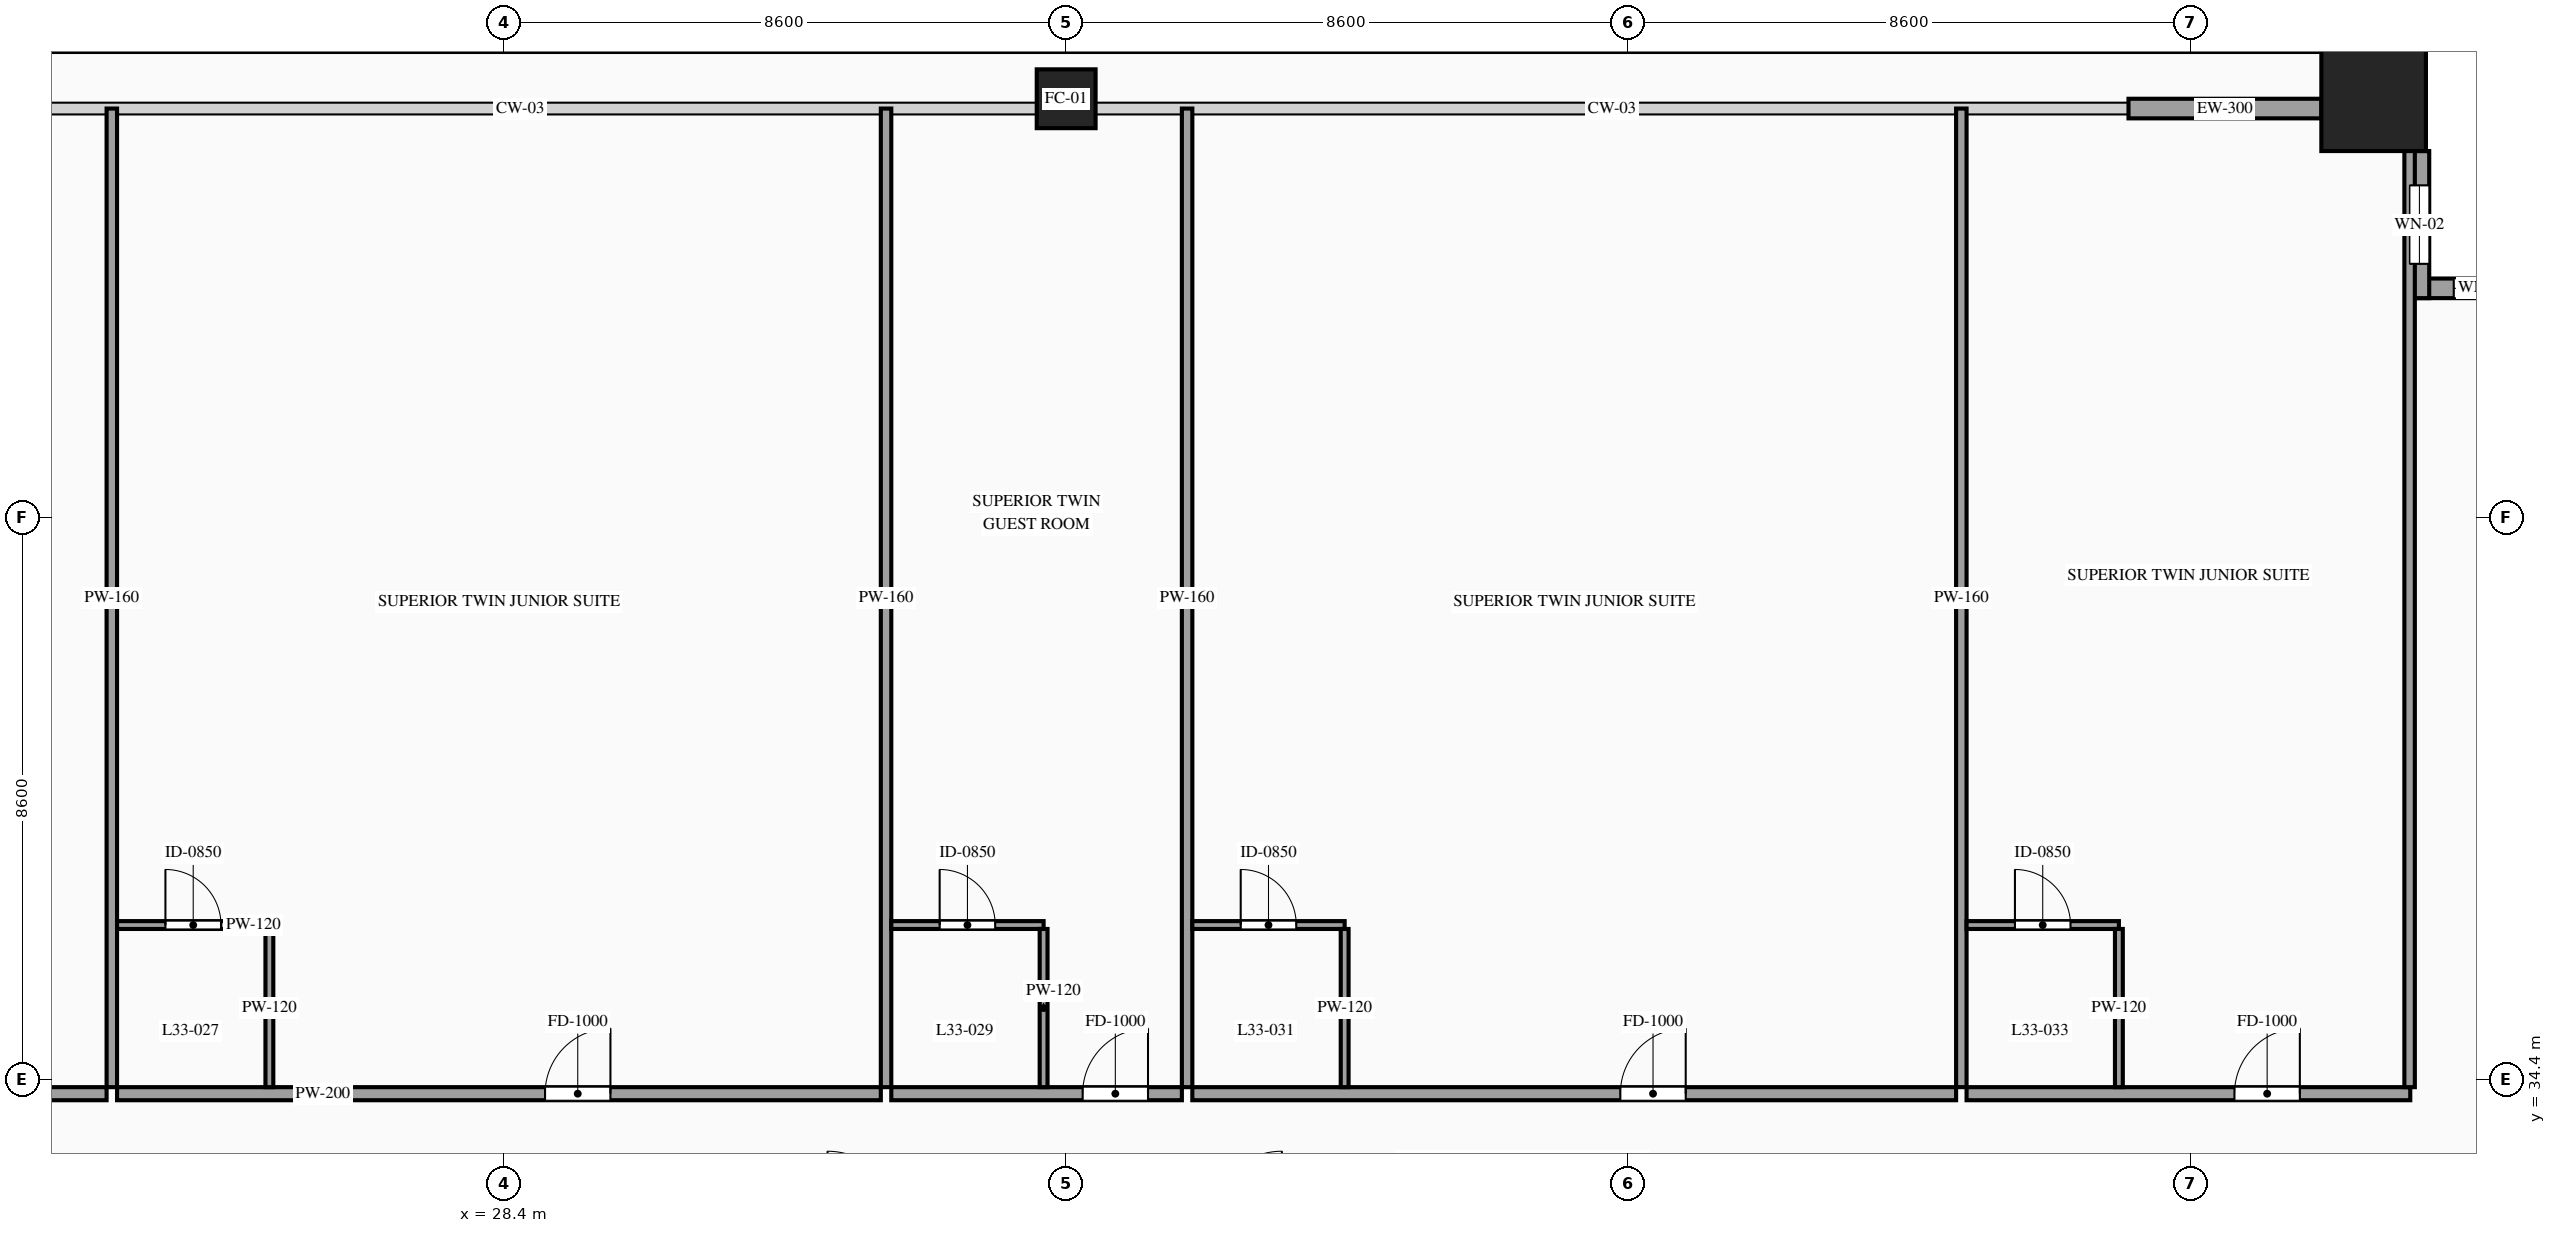
"""IFC4 building model, lengths in metres.
Left out: names, types, materials, properties, quantities, classifications, styles, units other than length and angle.
Written with IfcOpenShell. Run it as: python <this file> out.ifc"""

import sys

from ifc_helpers import new_model, si_unit, direction, frame, frame_2d, origin, origin_2d, place, context, subcontext, project, spatial, rectangle, hollow_rectangle, extrude, source, transform, mapped, element, fill, save


model = new_model("IFC4")
c1 = context("Model", 3, precision=1e-05, world=origin(), true_north=direction((0.0, 1.0)))
c2 = subcontext(c1, "Body", "Model", "MODEL_VIEW")
j1 = project(units=[si_unit("LENGTHUNIT", "METRE"), si_unit("PLANEANGLEUNIT", "RADIAN")], contexts=[c1])
p1 = place(None, origin())
s1 = spatial("IfcSite", under=j1, at=p1, CompositionType="ELEMENT")
p2 = place(p1, origin())
s2 = spatial("IfcBuilding", under=s1, at=p2, CompositionType="ELEMENT")
p3 = place(p2, frame((0.0, 0.0, 126.2)))
s3 = spatial("IfcBuildingStorey", under=s2, at=p3, CompositionType="ELEMENT", Elevation=126.2)
m1 = source(origin(), c2, "Body", "SweptSolid", [
    extrude(hollow_rectangle(XDim=0.9, YDim=0.9, WallThickness=0.042, at=origin_2d()), origin(), (0.0, 0.0, 1.0), 3.6),
])
p4 = place(p3, frame((37.0, 49.4, 0.0), z_axis=(0.0, 0.0, 1.0), x_axis=(1.0, 0.0, 0.0)))
e1 = element("IfcColumn", 1, at=p4, inside=s3, PredefinedType="COLUMN", context=c2, shape_type="MappedRepresentation", body=[
    mapped(m1, transform((0.0, 0.0, 0.0), scale=1.0)),
])
m2 = source(origin(), c2, "Body", "SweptSolid", [
    extrude(hollow_rectangle(XDim=1.6, YDim=1.6, WallThickness=0.07, at=origin_2d()), origin(), (0.0, 0.0, 1.0), 3.6),
])
p5 = place(p3, frame((57.0, 49.4, 0.0), z_axis=(0.0, 0.0, 1.0), x_axis=(1.0, 0.0, 0.0)))
e2 = element("IfcColumn", 2, at=p5, inside=s3, PredefinedType="COLUMN", context=c2, shape_type="MappedRepresentation", body=[
    mapped(m2, transform((0.0, 0.0, 0.0), scale=1.0)),
])
p6 = place(p3, frame((59.8, 46.5, 0.0), z_axis=(0.0, 0.0, 1.0), x_axis=(-1.0, 0.0, 0.0)))
e3 = element("IfcWall", 3, at=p6, inside=s3, PredefinedType="SOLIDWALL", context=c2, shape_type="SweptSolid", body=[
    extrude(rectangle(XDim=2.25, YDim=0.3, at=frame_2d((1.125, 0.0))), origin(), (0.0, 0.0, 1.0), 3.32),
])
p7 = place(p6, frame((0.675, 0.0, 0.85)))
e4 = element("IfcOpeningElement", 4, at=p7, cuts=e3, PredefinedType="OPENING", context=c2, shape_type="SweptSolid", body=[
    extrude(rectangle(XDim=0.9, YDim=1.5, at=frame_2d((0.45, 0.75))), frame((0.0, 0.165, 0.0), z_axis=(0.0, -1.0, 0.0), x_axis=(1.0, 0.0, 0.0)), (0.0, 0.0, 1.0), 0.33),
])
p8 = place(p3, frame((57.7, 46.35, 0.0), z_axis=(0.0, 0.0, 1.0), x_axis=(0.0, 1.0, 0.0)))
e5 = element("IfcWall", 5, at=p8, inside=s3, PredefinedType="SOLIDWALL", context=c2, shape_type="SweptSolid", body=[
    extrude(rectangle(XDim=2.25, YDim=0.3, at=frame_2d((1.125, 0.0))), origin(), (0.0, 0.0, 1.0), 3.32),
])
p9 = place(p8, frame((0.525, 0.0, 0.85)))
e6 = element("IfcOpeningElement", 6, at=p9, cuts=e5, PredefinedType="OPENING", context=c2, shape_type="SweptSolid", body=[
    extrude(rectangle(XDim=1.2, YDim=2.1, at=frame_2d((0.6, 1.05))), frame((0.0, 0.165, 0.0), z_axis=(0.0, -1.0, 0.0), x_axis=(1.0, 0.0, 0.0)), (0.0, 0.0, 1.0), 0.33),
])
m3 = source(origin(), c2, "Body", "SweptSolid", [
    extrude(rectangle(XDim=2.95, YDim=0.3, at=frame_2d((1.475, 0.0))), origin(), (0.0, 0.0, 1.0), 2.715),
])
p10 = place(p3, frame((53.25, 49.25, 0.0), z_axis=(0.0, 0.0, 1.0), x_axis=(1.0, 0.0, 0.0)))
e7 = element("IfcWall", 7, at=p10, inside=s3, PredefinedType="SOLIDWALL", context=c2, shape_type="MappedRepresentation", body=[
    mapped(m3, transform((0.0, 0.0, 0.0), scale=1.0)),
])
p11 = place(p3, frame((16.44, 34.18, 0.0), z_axis=(0.0, 0.0, 1.0), x_axis=(1.0, 0.0, 0.0)))
e8 = element("IfcWall", 8, at=p11, inside=s3, PredefinedType="PARTITIONING", context=c2, shape_type="SweptSolid", body=[
    extrude(rectangle(XDim=5.882, YDim=0.2, at=frame_2d((2.941, 0.0))), origin(), (0.0, 0.0, 1.0), 3.32),
])
p12 = place(p11, frame((3.646, 0.0, 0.0)))
e9 = element("IfcOpeningElement", 9, at=p12, cuts=e8, PredefinedType="OPENING", context=c2, shape_type="SweptSolid", body=[
    extrude(rectangle(XDim=1.0, YDim=2.2, at=frame_2d((0.5, 1.1))), frame((0.0, 0.115, 0.0), z_axis=(0.0, -1.0, 0.0), x_axis=(1.0, 0.0, 0.0)), (0.0, 0.0, 1.0), 0.23),
])
m4 = source(origin(), c2, "Body", "SweptSolid", [
    extrude(rectangle(XDim=14.97, YDim=0.16, at=frame_2d((7.485, 0.0))), origin(), (0.0, 0.0, 1.0), 3.32),
])
p13 = place(p3, frame((22.402, 34.28, 0.0), z_axis=(0.0, 0.0, 1.0), x_axis=(0.0, 1.0, 0.0)))
e10 = element("IfcWall", 10, at=p13, inside=s3, PredefinedType="PARTITIONING", context=c2, shape_type="MappedRepresentation", body=[
    mapped(m4, transform((0.0, 0.0, 0.0), scale=1.0)),
])
p14 = place(p3, frame((22.482, 34.18, 0.0), z_axis=(0.0, 0.0, 1.0), x_axis=(1.0, 0.0, 0.0)))
e11 = element("IfcWall", 11, at=p14, inside=s3, PredefinedType="PARTITIONING", context=c2, shape_type="SweptSolid", body=[
    extrude(rectangle(XDim=11.683, YDim=0.2, at=frame_2d((5.842, 0.0))), origin(), (0.0, 0.0, 1.0), 3.32),
])
p15 = place(p14, frame((6.547, 0.0, 0.0)))
e12 = element("IfcOpeningElement", 12, at=p15, cuts=e11, PredefinedType="OPENING", context=c2, shape_type="SweptSolid", body=[
    extrude(rectangle(XDim=1.0, YDim=2.2, at=frame_2d((0.5, 1.1))), frame((0.0, 0.115, 0.0), z_axis=(0.0, -1.0, 0.0), x_axis=(1.0, 0.0, 0.0)), (0.0, 0.0, 1.0), 0.23),
])
p16 = place(p3, frame((34.245, 34.28, 0.0), z_axis=(0.0, 0.0, 1.0), x_axis=(0.0, 1.0, 0.0)))
e13 = element("IfcWall", 13, at=p16, inside=s3, PredefinedType="PARTITIONING", context=c2, shape_type="MappedRepresentation", body=[
    mapped(m4, transform((0.0, 0.0, 0.0), scale=1.0)),
])
p17 = place(p3, frame((22.482, 36.76, 0.0), z_axis=(0.0, 0.0, 1.0), x_axis=(1.0, 0.0, 0.0)))
e14 = element("IfcWall", 14, at=p17, inside=s3, PredefinedType="PARTITIONING", context=c2, shape_type="SweptSolid", body=[
    extrude(rectangle(XDim=2.33, YDim=0.12, at=frame_2d((1.165, 0.0))), origin(), (0.0, 0.0, 1.0), 3.32),
])
p18 = place(p17, frame((0.74, 0.0, 0.0)))
e15 = element("IfcOpeningElement", 15, at=p18, cuts=e14, PredefinedType="OPENING", context=c2, shape_type="SweptSolid", body=[
    extrude(rectangle(XDim=0.85, YDim=2.1, at=frame_2d((0.425, 1.05))), frame((0.0, 0.075, 0.0), z_axis=(0.0, -1.0, 0.0), x_axis=(1.0, 0.0, 0.0)), (0.0, 0.0, 1.0), 0.15),
])
m5 = source(origin(), c2, "Body", "SweptSolid", [
    extrude(rectangle(XDim=2.42, YDim=0.12, at=frame_2d((1.21, 0.0))), origin(), (0.0, 0.0, 1.0), 3.32),
])
p19 = place(p3, frame((24.812, 34.28, 0.0), z_axis=(0.0, 0.0, 1.0), x_axis=(0.0, 1.0, 0.0)))
e16 = element("IfcWall", 16, at=p19, inside=s3, PredefinedType="PARTITIONING", context=c2, shape_type="MappedRepresentation", body=[
    mapped(m5, transform((0.0, 0.0, 0.0), scale=1.0)),
])
p20 = place(p3, frame((34.325, 34.18, 0.0), z_axis=(0.0, 0.0, 1.0), x_axis=(1.0, 0.0, 0.0)))
e17 = element("IfcWall", 17, at=p20, inside=s3, PredefinedType="PARTITIONING", context=c2, shape_type="SweptSolid", body=[
    extrude(rectangle(XDim=4.445, YDim=0.2, at=frame_2d((2.223, 0.0))), origin(), (0.0, 0.0, 1.0), 3.32),
])
p21 = place(p20, frame((2.927, 0.0, 0.0)))
e18 = element("IfcOpeningElement", 18, at=p21, cuts=e17, PredefinedType="OPENING", context=c2, shape_type="SweptSolid", body=[
    extrude(rectangle(XDim=1.0, YDim=2.2, at=frame_2d((0.5, 1.1))), frame((0.0, 0.115, 0.0), z_axis=(0.0, -1.0, 0.0), x_axis=(1.0, 0.0, 0.0)), (0.0, 0.0, 1.0), 0.23),
])
p22 = place(p3, frame((38.85, 34.28, 0.0), z_axis=(0.0, 0.0, 1.0), x_axis=(0.0, 1.0, 0.0)))
e19 = element("IfcWall", 19, at=p22, inside=s3, PredefinedType="PARTITIONING", context=c2, shape_type="MappedRepresentation", body=[
    mapped(m4, transform((0.0, 0.0, 0.0), scale=1.0)),
])
p23 = place(p3, frame((34.325, 36.76, 0.0), z_axis=(0.0, 0.0, 1.0), x_axis=(1.0, 0.0, 0.0)))
e20 = element("IfcWall", 20, at=p23, inside=s3, PredefinedType="PARTITIONING", context=c2, shape_type="SweptSolid", body=[
    extrude(rectangle(XDim=2.33, YDim=0.12, at=frame_2d((1.165, 0.0))), origin(), (0.0, 0.0, 1.0), 3.32),
])
p24 = place(p23, frame((0.74, 0.0, 0.0)))
e21 = element("IfcOpeningElement", 21, at=p24, cuts=e20, PredefinedType="OPENING", context=c2, shape_type="SweptSolid", body=[
    extrude(rectangle(XDim=0.85, YDim=2.1, at=frame_2d((0.425, 1.05))), frame((0.0, 0.075, 0.0), z_axis=(0.0, -1.0, 0.0), x_axis=(1.0, 0.0, 0.0)), (0.0, 0.0, 1.0), 0.15),
])
p25 = place(p3, frame((36.655, 34.28, 0.0), z_axis=(0.0, 0.0, 1.0), x_axis=(0.0, 1.0, 0.0)))
e22 = element("IfcWall", 22, at=p25, inside=s3, PredefinedType="PARTITIONING", context=c2, shape_type="MappedRepresentation", body=[
    mapped(m5, transform((0.0, 0.0, 0.0), scale=1.0)),
])
p26 = place(p3, frame((38.93, 34.18, 0.0), z_axis=(0.0, 0.0, 1.0), x_axis=(1.0, 0.0, 0.0)))
e23 = element("IfcWall", 23, at=p26, inside=s3, PredefinedType="PARTITIONING", context=c2, shape_type="SweptSolid", body=[
    extrude(rectangle(XDim=11.683, YDim=0.2, at=frame_2d((5.842, 0.0))), origin(), (0.0, 0.0, 1.0), 3.32),
])
p27 = place(p26, frame((6.547, 0.0, 0.0)))
e24 = element("IfcOpeningElement", 24, at=p27, cuts=e23, PredefinedType="OPENING", context=c2, shape_type="SweptSolid", body=[
    extrude(rectangle(XDim=1.0, YDim=2.2, at=frame_2d((0.5, 1.1))), frame((0.0, 0.115, 0.0), z_axis=(0.0, -1.0, 0.0), x_axis=(1.0, 0.0, 0.0)), (0.0, 0.0, 1.0), 0.23),
])
p28 = place(p3, frame((50.693, 34.28, 0.0), z_axis=(0.0, 0.0, 1.0), x_axis=(0.0, 1.0, 0.0)))
e25 = element("IfcWall", 25, at=p28, inside=s3, PredefinedType="PARTITIONING", context=c2, shape_type="MappedRepresentation", body=[
    mapped(m4, transform((0.0, 0.0, 0.0), scale=1.0)),
])
p29 = place(p3, frame((38.93, 36.76, 0.0), z_axis=(0.0, 0.0, 1.0), x_axis=(1.0, 0.0, 0.0)))
e26 = element("IfcWall", 26, at=p29, inside=s3, PredefinedType="PARTITIONING", context=c2, shape_type="SweptSolid", body=[
    extrude(rectangle(XDim=2.33, YDim=0.12, at=frame_2d((1.165, 0.0))), origin(), (0.0, 0.0, 1.0), 3.32),
])
p30 = place(p29, frame((0.74, 0.0, 0.0)))
e27 = element("IfcOpeningElement", 27, at=p30, cuts=e26, PredefinedType="OPENING", context=c2, shape_type="SweptSolid", body=[
    extrude(rectangle(XDim=0.85, YDim=2.1, at=frame_2d((0.425, 1.05))), frame((0.0, 0.075, 0.0), z_axis=(0.0, -1.0, 0.0), x_axis=(1.0, 0.0, 0.0)), (0.0, 0.0, 1.0), 0.15),
])
p31 = place(p3, frame((41.26, 34.28, 0.0), z_axis=(0.0, 0.0, 1.0), x_axis=(0.0, 1.0, 0.0)))
e28 = element("IfcWall", 28, at=p31, inside=s3, PredefinedType="PARTITIONING", context=c2, shape_type="MappedRepresentation", body=[
    mapped(m5, transform((0.0, 0.0, 0.0), scale=1.0)),
])
p32 = place(p3, frame((50.773, 34.18, 0.0), z_axis=(0.0, 0.0, 1.0), x_axis=(1.0, 0.0, 0.0)))
e29 = element("IfcWall", 29, at=p32, inside=s3, PredefinedType="PARTITIONING", context=c2, shape_type="SweptSolid", body=[
    extrude(rectangle(XDim=6.787, YDim=0.2, at=frame_2d((3.394, 0.0))), origin(), (0.0, 0.0, 1.0), 3.32),
])
p33 = place(p32, frame((4.098, 0.0, 0.0)))
e30 = element("IfcOpeningElement", 30, at=p33, cuts=e29, PredefinedType="OPENING", context=c2, shape_type="SweptSolid", body=[
    extrude(rectangle(XDim=1.0, YDim=2.2, at=frame_2d((0.5, 1.1))), frame((0.0, 0.115, 0.0), z_axis=(0.0, -1.0, 0.0), x_axis=(1.0, 0.0, 0.0)), (0.0, 0.0, 1.0), 0.23),
])
m6 = source(origin(), c2, "Body", "SweptSolid", [
    extrude(rectangle(XDim=14.82, YDim=0.16, at=frame_2d((7.41, 0.0))), origin(), (0.0, 0.0, 1.0), 3.32),
])
p34 = place(p3, frame((57.55, 34.28, 0.0), z_axis=(0.0, 0.0, 1.0), x_axis=(0.0, 1.0, 0.0)))
e31 = element("IfcWall", 31, at=p34, inside=s3, PredefinedType="PARTITIONING", context=c2, shape_type="MappedRepresentation", body=[
    mapped(m6, transform((0.0, 0.0, 0.0), scale=1.0)),
])
p35 = place(p3, frame((50.773, 36.76, 0.0), z_axis=(0.0, 0.0, 1.0), x_axis=(1.0, 0.0, 0.0)))
e32 = element("IfcWall", 32, at=p35, inside=s3, PredefinedType="PARTITIONING", context=c2, shape_type="SweptSolid", body=[
    extrude(rectangle(XDim=2.33, YDim=0.12, at=frame_2d((1.165, 0.0))), origin(), (0.0, 0.0, 1.0), 3.32),
])
p36 = place(p35, frame((0.74, 0.0, 0.0)))
e33 = element("IfcOpeningElement", 33, at=p36, cuts=e32, PredefinedType="OPENING", context=c2, shape_type="SweptSolid", body=[
    extrude(rectangle(XDim=0.85, YDim=2.1, at=frame_2d((0.425, 1.05))), frame((0.0, 0.075, 0.0), z_axis=(0.0, -1.0, 0.0), x_axis=(1.0, 0.0, 0.0)), (0.0, 0.0, 1.0), 0.15),
])
p37 = place(p3, frame((53.103, 34.28, 0.0), z_axis=(0.0, 0.0, 1.0), x_axis=(0.0, 1.0, 0.0)))
e34 = element("IfcWall", 34, at=p37, inside=s3, PredefinedType="PARTITIONING", context=c2, shape_type="MappedRepresentation", body=[
    mapped(m5, transform((0.0, 0.0, 0.0), scale=1.0)),
])
m7 = source(origin(), c2, "Body", "SweptSolid", [
    extrude(rectangle(XDim=0.9, YDim=1.5, at=frame_2d((0.45, 0.75))), frame((0.0, 0.03, 0.0), z_axis=(0.0, -1.0, 0.0), x_axis=(1.0, 0.0, 0.0)), (0.0, 0.0, 1.0), 0.06),
])
p38 = place(p7, origin())
e35 = element("IfcWindow", 35, at=p38, inside=s3, PartitioningType="SINGLE_PANEL", PredefinedType="WINDOW", context=c2, shape_type="MappedRepresentation", body=[
    mapped(m7, transform((0.0, 0.0, 0.0), scale=1.0)),
])
fill(e4, e35)
m8 = source(origin(), c2, "Body", "SweptSolid", [
    extrude(rectangle(XDim=1.2, YDim=2.1, at=frame_2d((0.6, 1.05))), frame((0.0, 0.03, 0.0), z_axis=(0.0, -1.0, 0.0), x_axis=(1.0, 0.0, 0.0)), (0.0, 0.0, 1.0), 0.06),
])
p39 = place(p9, origin())
e36 = element("IfcWindow", 36, at=p39, inside=s3, PartitioningType="SINGLE_PANEL", PredefinedType="WINDOW", context=c2, shape_type="MappedRepresentation", body=[
    mapped(m8, transform((0.0, 0.0, 0.0), scale=1.0)),
])
fill(e6, e36)
m9 = source(origin(), c2, "Body", "SweptSolid", [
    extrude(rectangle(XDim=1.0, YDim=2.2, at=frame_2d((0.5, 1.1))), frame((0.0, 0.025, 0.0), z_axis=(0.0, -1.0, 0.0), x_axis=(1.0, 0.0, 0.0)), (0.0, 0.0, 1.0), 0.05),
])
p40 = place(p15, origin())
e37 = element("IfcDoor", 37, at=p40, inside=s3, OperationType="SINGLE_SWING_RIGHT", PredefinedType="DOOR", context=c2, shape_type="MappedRepresentation", body=[
    mapped(m9, transform((0.0, 0.0, 0.0), scale=1.0)),
])
fill(e12, e37)
m10 = source(origin(), c2, "Body", "SweptSolid", [
    extrude(rectangle(XDim=0.85, YDim=2.1, at=frame_2d((0.425, 1.05))), frame((0.0, 0.025, 0.0), z_axis=(0.0, -1.0, 0.0), x_axis=(1.0, 0.0, 0.0)), (0.0, 0.0, 1.0), 0.05),
])
p41 = place(p18, origin())
e38 = element("IfcDoor", 38, at=p41, inside=s3, OperationType="SINGLE_SWING_LEFT", PredefinedType="DOOR", context=c2, shape_type="MappedRepresentation", body=[
    mapped(m10, transform((0.0, 0.0, 0.0), scale=1.0)),
])
fill(e15, e38)
p42 = place(p21, origin())
e39 = element("IfcDoor", 39, at=p42, inside=s3, OperationType="SINGLE_SWING_RIGHT", PredefinedType="DOOR", context=c2, shape_type="MappedRepresentation", body=[
    mapped(m9, transform((0.0, 0.0, 0.0), scale=1.0)),
])
fill(e18, e39)
p43 = place(p24, origin())
e40 = element("IfcDoor", 40, at=p43, inside=s3, OperationType="SINGLE_SWING_LEFT", PredefinedType="DOOR", context=c2, shape_type="MappedRepresentation", body=[
    mapped(m10, transform((0.0, 0.0, 0.0), scale=1.0)),
])
fill(e21, e40)
p44 = place(p27, origin())
e41 = element("IfcDoor", 41, at=p44, inside=s3, OperationType="SINGLE_SWING_RIGHT", PredefinedType="DOOR", context=c2, shape_type="MappedRepresentation", body=[
    mapped(m9, transform((0.0, 0.0, 0.0), scale=1.0)),
])
fill(e24, e41)
p45 = place(p30, origin())
e42 = element("IfcDoor", 42, at=p45, inside=s3, OperationType="SINGLE_SWING_LEFT", PredefinedType="DOOR", context=c2, shape_type="MappedRepresentation", body=[
    mapped(m10, transform((0.0, 0.0, 0.0), scale=1.0)),
])
fill(e27, e42)
p46 = place(p33, origin())
e43 = element("IfcDoor", 43, at=p46, inside=s3, OperationType="SINGLE_SWING_RIGHT", PredefinedType="DOOR", context=c2, shape_type="MappedRepresentation", body=[
    mapped(m9, transform((0.0, 0.0, 0.0), scale=1.0)),
])
fill(e30, e43)
p47 = place(p36, origin())
e44 = element("IfcDoor", 44, at=p47, inside=s3, OperationType="SINGLE_SWING_LEFT", PredefinedType="DOOR", context=c2, shape_type="MappedRepresentation", body=[
    mapped(m10, transform((0.0, 0.0, 0.0), scale=1.0)),
])
fill(e33, e44)
save(model, sys.argv[1])
